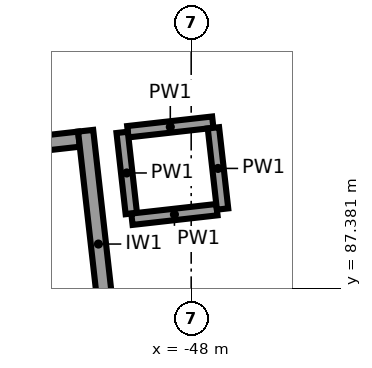
"""IFC4 building model, lengths in metres.
Left out: names, types, materials, properties, quantities, classifications, styles, units other than length and angle.
Written with IfcOpenShell. Run it as: python <this file> out.ifc"""

import sys

from ifc_helpers import new_model, si_unit, direction, frame, frame_2d, origin, place, context, subcontext, project, spatial, rectangle, extrude, element, save


model = new_model("IFC4")
c1 = context("Model", 3, precision=1e-05, world=origin(), true_north=direction((0.0, 1.0)))
c2 = subcontext(c1, "Body", "Model", "MODEL_VIEW")
j1 = project(units=[si_unit("LENGTHUNIT", "METRE"), si_unit("PLANEANGLEUNIT", "RADIAN")], contexts=[c1])
p1 = place(None, origin())
s1 = spatial("IfcSite", under=j1, at=p1, CompositionType="ELEMENT")
p2 = place(p1, origin())
s2 = spatial("IfcBuilding", under=s1, at=p2, CompositionType="ELEMENT")
p3 = place(p2, origin())
s3 = spatial("IfcBuildingStorey", under=s2, at=p3, CompositionType="ELEMENT", Elevation=0.0)
p4 = place(p3, frame((-49.389, 89.454, 0.0), z_axis=(0.0, 0.0, 1.0), x_axis=(0.111976588553, -0.993710845073, 0.0)))
e1 = element("IfcWall", 1, at=p4, inside=s3, PredefinedType="SHEAR", context=c2, shape_type="SweptSolid", body=[
    extrude(rectangle(XDim=3.0, YDim=0.2, at=frame_2d((1.5, 0.0))), origin(), (0.0, 0.0, 1.0), 6.15),
])
p5 = place(p3, frame((-49.477, 89.343, 0.0), z_axis=(0.0, 0.0, 1.0), x_axis=(-0.993718105662, -0.11191213732, 0.0)))
e2 = element("IfcWall", 2, at=p5, inside=s3, PredefinedType="SHEAR", context=c2, shape_type="SweptSolid", body=[
    extrude(rectangle(XDim=1.9, YDim=0.2, at=frame_2d((0.95, 0.0))), origin(), (0.0, 0.0, 1.0), 6.15),
])
p6 = place(p3, frame((-47.716, 89.567, 0.0), z_axis=(0.0, 0.0, 1.0), x_axis=(-0.993710504932, -0.11197960702, 0.0)))
e3 = element("IfcWall", 3, at=p6, inside=s3, PredefinedType="PARTITIONING", context=c2, shape_type="SweptSolid", body=[
    extrude(rectangle(XDim=1.125, YDim=0.15, at=frame_2d((0.562, 0.0))), origin(), (0.0, 0.0, 1.0), 6.15),
])
p7 = place(p3, frame((-48.908, 89.432, 0.0), z_axis=(0.0, 0.0, 1.0), x_axis=(0.111951742856, -0.993713644503, 0.0)))
e4 = element("IfcWall", 4, at=p7, inside=s3, PredefinedType="PARTITIONING", context=c2, shape_type="SweptSolid", body=[
    extrude(rectangle(XDim=1.075, YDim=0.15, at=frame_2d((0.538, 0.0))), origin(), (0.0, 0.0, 1.0), 6.15),
])
p8 = place(p3, frame((-48.78, 88.29, 0.0), z_axis=(0.0, 0.0, 1.0), x_axis=(0.993710504932, 0.11197960702, 0.0)))
e5 = element("IfcWall", 5, at=p8, inside=s3, PredefinedType="PARTITIONING", context=c2, shape_type="SweptSolid", body=[
    extrude(rectangle(XDim=1.125, YDim=0.15, at=frame_2d((0.562, 0.0))), origin(), (0.0, 0.0, 1.0), 6.15),
])
p9 = place(p3, frame((-47.587, 88.424, 0.0), z_axis=(0.0, 0.0, 1.0), x_axis=(-0.111951742856, 0.993713644503, 0.0)))
e6 = element("IfcWall", 6, at=p9, inside=s3, PredefinedType="PARTITIONING", context=c2, shape_type="SweptSolid", body=[
    extrude(rectangle(XDim=1.075, YDim=0.15, at=frame_2d((0.538, 0.0))), origin(), (0.0, 0.0, 1.0), 6.15),
])
save(model, sys.argv[1])
